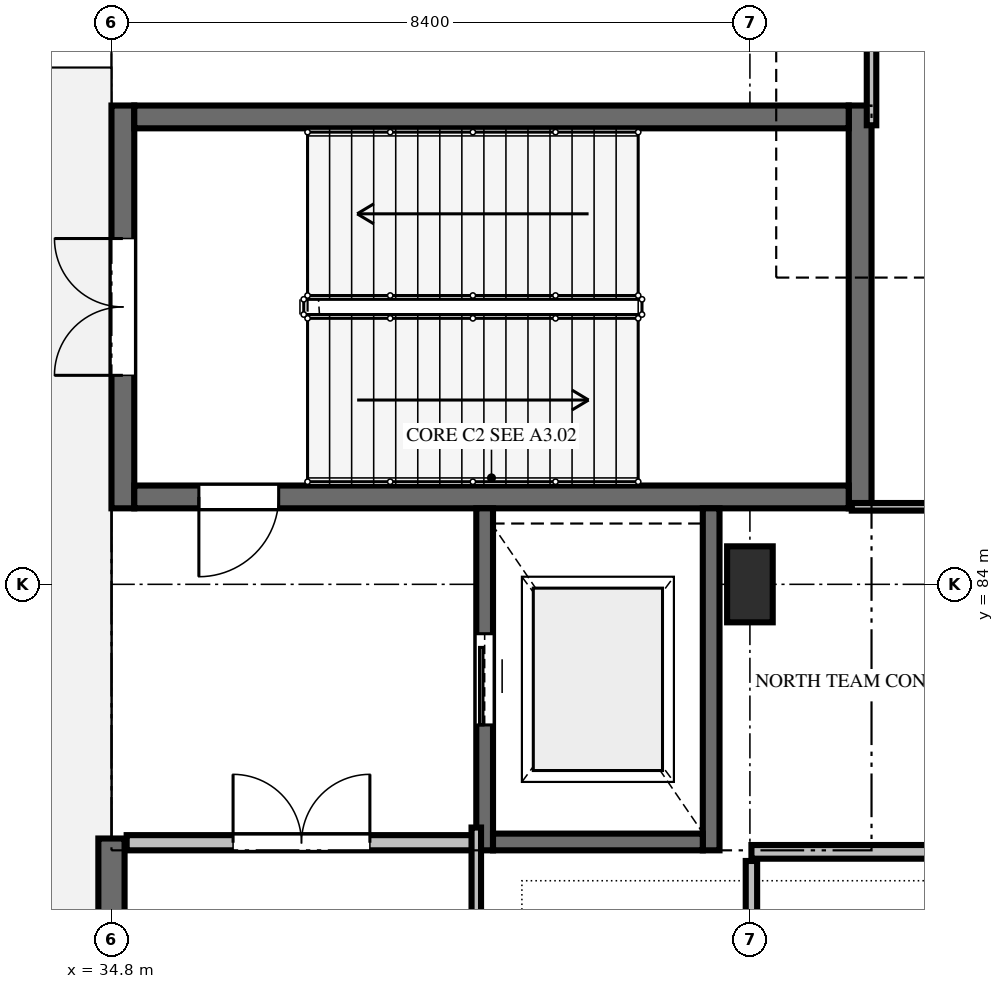
"""IFC4 building model, lengths in metres.
Left out: names, types, materials, properties, quantities, classifications, styles, units other than length and angle.
Written with IfcOpenShell. Run it as: python <this file> out.ifc"""

import sys

from ifc_helpers import new_model, si_unit, direction, frame, frame_2d, origin, origin_2d, place, context, subcontext, project, spatial, rectangle, extrude, element, fill, save


model = new_model("IFC4")
c1 = context("Model", 3, precision=1e-05, world=origin(), true_north=direction((0.0, 1.0)))
c2 = subcontext(c1, "Body", "Model", "MODEL_VIEW")
j1 = project(units=[si_unit("LENGTHUNIT", "METRE"), si_unit("PLANEANGLEUNIT", "RADIAN")], contexts=[c1])
p1 = place(None, origin())
s1 = spatial("IfcSite", under=j1, at=p1, CompositionType="ELEMENT")
p2 = place(p1, origin())
s2 = spatial("IfcBuilding", under=s1, at=p2, CompositionType="ELEMENT")
p3 = place(p2, origin())
s3 = spatial("IfcBuildingStorey", under=s2, at=p3, CompositionType="ELEMENT", Elevation=0.0)
p4 = place(p3, frame((43.2, 84.0, 0.0), z_axis=(0.0, 0.0, 1.0), x_axis=(1.0, 0.0, 0.0)))
e1 = element("IfcColumn", 1, at=p4, inside=s3, PredefinedType="COLUMN", context=c2, shape_type="SweptSolid", body=[
    extrude(rectangle(XDim=0.6, YDim=1.0, at=origin_2d()), origin(), (0.0, 0.0, 1.0), 5.4),
])
p5 = place(p3, frame((34.8, 75.946, 0.0), z_axis=(0.0, 0.0, 1.0), x_axis=(0.0, 1.0, 0.0)))
e2 = element("IfcWall", 2, at=p5, inside=s3, PredefinedType="SOLIDWALL", context=c2, shape_type="SweptSolid", body=[
    extrude(rectangle(XDim=4.709, YDim=0.345, at=frame_2d((2.355, 0.0))), origin(), (0.0, 0.0, 1.0), 4.176),
])
p6 = place(p3, frame((34.95, 85.0, 0.0), z_axis=(0.0, 0.0, 1.0), x_axis=(0.0, 1.0, 0.0)))
e3 = element("IfcWall", 3, at=p6, inside=s3, PredefinedType="SHEAR", context=c2, shape_type="SweptSolid", body=[
    extrude(rectangle(XDim=5.3, YDim=0.3, at=frame_2d((2.65, 0.0))), origin(), (0.0, 0.0, 1.0), 5.17),
])
p7 = place(p6, frame((1.75, 0.0, 0.0)))
e4 = element("IfcOpeningElement", 4, at=p7, cuts=e3, PredefinedType="OPENING", context=c2, shape_type="SweptSolid", body=[
    extrude(rectangle(XDim=1.8, YDim=2.25, at=frame_2d((0.9, 1.125))), frame((0.0, 0.16, 0.0), z_axis=(0.0, -1.0, 0.0), x_axis=(1.0, 0.0, 0.0)), (0.0, 0.0, 1.0), 0.32),
])
p8 = place(p3, frame((44.65, 90.3, 0.0), z_axis=(0.0, 0.0, 1.0), x_axis=(0.0, -1.0, 0.0)))
e5 = element("IfcWall", 5, at=p8, inside=s3, PredefinedType="SHEAR", context=c2, shape_type="SweptSolid", body=[
    extrude(rectangle(XDim=5.3, YDim=0.3, at=frame_2d((2.65, 0.0))), origin(), (0.0, 0.0, 1.0), 5.17),
])
p9 = place(p3, frame((44.5, 85.15, 0.0), z_axis=(0.0, 0.0, 1.0), x_axis=(-1.0, 0.0, 0.0)))
e6 = element("IfcWall", 6, at=p9, inside=s3, PredefinedType="SHEAR", context=c2, shape_type="SweptSolid", body=[
    extrude(rectangle(XDim=9.4, YDim=0.3, at=frame_2d((4.7, 0.0))), origin(), (0.0, 0.0, 1.0), 5.17),
])
p10 = place(p9, frame((7.5, 0.0, 0.0)))
e7 = element("IfcOpeningElement", 7, at=p10, cuts=e6, PredefinedType="OPENING", context=c2, shape_type="SweptSolid", body=[
    extrude(rectangle(XDim=1.05, YDim=2.2, at=frame_2d((0.525, 1.1))), frame((0.0, 0.16, 0.0), z_axis=(0.0, -1.0, 0.0), x_axis=(1.0, 0.0, 0.0)), (0.0, 0.0, 1.0), 0.32),
])
p11 = place(p3, frame((35.1, 90.15, 0.0), z_axis=(0.0, 0.0, 1.0), x_axis=(1.0, 0.0, 0.0)))
e8 = element("IfcWall", 8, at=p11, inside=s3, PredefinedType="SHEAR", context=c2, shape_type="SweptSolid", body=[
    extrude(rectangle(XDim=9.4, YDim=0.3, at=frame_2d((4.7, 0.0))), origin(), (0.0, 0.0, 1.0), 5.17),
])
p12 = place(p3, frame((35.0, 80.6, 0.0), z_axis=(0.0, 0.0, 1.0), x_axis=(1.0, 0.0, 0.0)))
e9 = element("IfcWall", 9, at=p12, inside=s3, PredefinedType="SOLIDWALL", context=c2, shape_type="SweptSolid", body=[
    extrude(rectangle(XDim=4.6, YDim=0.2, at=frame_2d((2.3, 0.0))), origin(), (0.0, 0.0, 1.0), 4.178),
])
p13 = place(p12, frame((1.4, 0.0, 0.0)))
e10 = element("IfcOpeningElement", 10, at=p13, cuts=e9, PredefinedType="OPENING", context=c2, shape_type="SweptSolid", body=[
    extrude(rectangle(XDim=1.8, YDim=2.2, at=frame_2d((0.9, 1.1))), frame((0.0, 0.11, 0.0), z_axis=(0.0, -1.0, 0.0), x_axis=(1.0, 0.0, 0.0)), (0.0, 0.0, 1.0), 0.22),
])
p14 = place(p3, frame((39.71, 80.5, 0.0), z_axis=(0.0, 0.0, 1.0), x_axis=(0.0, 1.0, 0.0)))
e11 = element("IfcWall", 11, at=p14, inside=s3, PredefinedType="SOLIDWALL", context=c2, shape_type="SweptSolid", body=[
    extrude(rectangle(XDim=4.5, YDim=0.22, at=frame_2d((2.25, 0.0))), origin(), (0.0, 0.0, 1.0), 5.17),
])
p15 = place(p14, frame((1.65, 0.0, 0.0)))
e12 = element("IfcOpeningElement", 12, at=p15, cuts=e11, PredefinedType="OPENING", context=c2, shape_type="SweptSolid", body=[
    extrude(rectangle(XDim=1.2, YDim=2.2, at=frame_2d((0.6, 1.1))), frame((0.0, 0.12, 0.0), z_axis=(0.0, -1.0, 0.0), x_axis=(1.0, 0.0, 0.0)), (0.0, 0.0, 1.0), 0.24),
])
p16 = place(p3, frame((42.69, 80.5, 0.0), z_axis=(0.0, 0.0, 1.0), x_axis=(0.0, 1.0, 0.0)))
e13 = element("IfcWall", 13, at=p16, inside=s3, PredefinedType="SOLIDWALL", context=c2, shape_type="SweptSolid", body=[
    extrude(rectangle(XDim=4.5, YDim=0.22, at=frame_2d((2.25, 0.0))), origin(), (0.0, 0.0, 1.0), 5.17),
])
p17 = place(p3, frame((39.82, 80.61, 0.0), z_axis=(0.0, 0.0, 1.0), x_axis=(1.0, 0.0, 0.0)))
e14 = element("IfcWall", 14, at=p17, inside=s3, PredefinedType="SOLIDWALL", context=c2, shape_type="SweptSolid", body=[
    extrude(rectangle(XDim=2.76, YDim=0.22, at=frame_2d((1.38, 0.0))), origin(), (0.0, 0.0, 1.0), 5.17),
])
p18 = place(p3, frame((43.22, 80.48, 0.0), z_axis=(0.0, 0.0, 1.0), x_axis=(1.0, 0.0, 0.0)))
e15 = element("IfcWall", 15, at=p18, inside=s3, PredefinedType="PARTITIONING", context=c2, shape_type="SweptSolid", body=[
    extrude(rectangle(XDim=38.56, YDim=0.18, at=frame_2d((19.28, 0.0))), origin(), (0.0, 0.0, 1.0), 4.17),
])
p19 = place(p18, frame((18.48, 0.0, 0.0)))
e16 = element("IfcOpeningElement", 16, at=p19, cuts=e15, PredefinedType="OPENING", context=c2, shape_type="SweptSolid", body=[
    extrude(rectangle(XDim=1.6, YDim=2.2, at=frame_2d((0.8, 1.1))), frame((0.0, 0.1, 0.0), z_axis=(0.0, -1.0, 0.0), x_axis=(1.0, 0.0, 0.0)), (0.0, 0.0, 1.0), 0.2),
])
p20 = place(p3, frame((43.22, 36.94, 0.0), z_axis=(0.0, 0.0, 1.0), x_axis=(0.0, 1.0, 0.0)))
e17 = element("IfcWall", 17, at=p20, inside=s3, PredefinedType="PARTITIONING", context=c2, shape_type="SweptSolid", body=[
    extrude(rectangle(XDim=43.42, YDim=0.15, at=frame_2d((21.71, 0.0))), origin(), (0.0, 0.0, 1.0), 4.17),
])
p21 = place(p20, frame((20.91, 0.0, 0.0)))
e18 = element("IfcOpeningElement", 18, at=p21, cuts=e17, PredefinedType="OPENING", context=c2, shape_type="SweptSolid", body=[
    extrude(rectangle(XDim=1.6, YDim=2.2, at=frame_2d((0.8, 1.1))), frame((0.0, 0.085, 0.0), z_axis=(0.0, -1.0, 0.0), x_axis=(1.0, 0.0, 0.0)), (0.0, 0.0, 1.0), 0.17),
])
p22 = place(p3, frame((58.48, 85.02, 0.0), z_axis=(0.0, 0.0, 1.0), x_axis=(-1.0, 0.0, 0.0)))
e19 = element("IfcWall", 19, at=p22, inside=s3, PredefinedType="PARTITIONING", context=c2, shape_type="SweptSolid", body=[
    extrude(rectangle(XDim=13.94, YDim=0.1, at=frame_2d((6.97, 0.0))), origin(), (0.0, 0.0, 1.0), 4.388),
])
p23 = place(p22, frame((7.344, 0.0, 0.0)))
e20 = element("IfcOpeningElement", 20, at=p23, cuts=e19, PredefinedType="OPENING", context=c2, shape_type="SweptSolid", body=[
    extrude(rectangle(XDim=1.0, YDim=2.15, at=frame_2d((0.5, 1.075))), frame((0.0, 0.06, 0.0), z_axis=(0.0, -1.0, 0.0), x_axis=(1.0, 0.0, 0.0)), (0.0, 0.0, 1.0), 0.12),
])
p24 = place(p3, frame((44.8, 90.04, 0.0), z_axis=(0.0, 0.0, 1.0), x_axis=(0.0, 1.0, 0.0)))
e21 = element("IfcWall", 21, at=p24, inside=s3, PredefinedType="PARTITIONING", context=c2, shape_type="SweptSolid", body=[
    extrude(rectangle(XDim=1.38, YDim=0.125, at=frame_2d((0.69, 0.0))), origin(), (0.0, 0.0, 1.0), 4.52),
])
p25 = place(p3, frame((39.6, 79.0, 0.0), z_axis=(0.0, 0.0, 1.0), x_axis=(0.0, 1.0, 0.0)))
e22 = element("IfcWall", 22, at=p25, inside=s3, PredefinedType="PARTITIONING", context=c2, shape_type="SweptSolid", body=[
    extrude(rectangle(XDim=1.8, YDim=0.125, at=frame_2d((0.9, 0.0))), origin(), (0.0, 0.0, 1.0), 5.05),
])
p26 = place(p7, origin())
e23 = element("IfcDoor", 23, at=p26, inside=s3, OperationType="DOUBLE_DOOR_SINGLE_SWING", PredefinedType="DOOR", context=c2, shape_type="SweptSolid", body=[
    extrude(rectangle(XDim=1.8, YDim=2.25, at=frame_2d((0.9, 1.125))), frame((0.0, 0.025, 0.0), z_axis=(0.0, -1.0, 0.0), x_axis=(1.0, 0.0, 0.0)), (0.0, 0.0, 1.0), 0.05),
])
fill(e4, e23)
p27 = place(p10, origin())
e24 = element("IfcDoor", 24, at=p27, inside=s3, OperationType="SINGLE_SWING_RIGHT", PredefinedType="DOOR", context=c2, shape_type="SweptSolid", body=[
    extrude(rectangle(XDim=1.05, YDim=2.2, at=frame_2d((0.525, 1.1))), frame((0.0, 0.025, 0.0), z_axis=(0.0, -1.0, 0.0), x_axis=(1.0, 0.0, 0.0)), (0.0, 0.0, 1.0), 0.05),
])
fill(e7, e24)
p28 = place(p13, origin())
e25 = element("IfcDoor", 25, at=p28, inside=s3, OperationType="DOUBLE_DOOR_SINGLE_SWING", PredefinedType="DOOR", context=c2, shape_type="SweptSolid", body=[
    extrude(rectangle(XDim=1.8, YDim=2.2, at=frame_2d((0.9, 1.1))), frame((0.0, 0.025, 0.0), z_axis=(0.0, -1.0, 0.0), x_axis=(1.0, 0.0, 0.0)), (0.0, 0.0, 1.0), 0.05),
])
fill(e10, e25)
p29 = place(p15, origin())
e26 = element("IfcDoor", 26, at=p29, inside=s3, OperationType="SLIDING_TO_LEFT", PredefinedType="DOOR", context=c2, shape_type="SweptSolid", body=[
    extrude(rectangle(XDim=1.2, YDim=2.2, at=frame_2d((0.6, 1.1))), frame((0.0, 0.025, 0.0), z_axis=(0.0, -1.0, 0.0), x_axis=(1.0, 0.0, 0.0)), (0.0, 0.0, 1.0), 0.05),
])
fill(e12, e26)
save(model, sys.argv[1])
